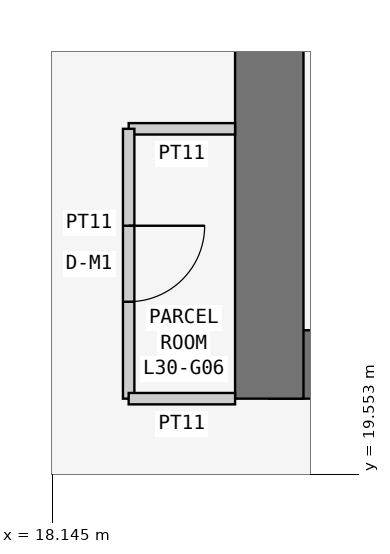
"""IFC4 building model, lengths in metres.
Left out: names, types, materials, properties, quantities, classifications, styles, units other than length and angle.
Written with IfcOpenShell. Run it as: python <this file> out.ifc"""

import sys

from ifc_helpers import new_model, si_unit, direction, frame, frame_2d, origin, place, context, subcontext, project, spatial, rectangle, extrude, element, fill, save


model = new_model("IFC4")
c1 = context("Model", 3, precision=1e-05, world=origin(), true_north=direction((0.0, 1.0)))
c2 = subcontext(c1, "Body", "Model", "MODEL_VIEW")
j1 = project(units=[si_unit("LENGTHUNIT", "METRE"), si_unit("PLANEANGLEUNIT", "RADIAN")], contexts=[c1])
p1 = place(None, origin())
s1 = spatial("IfcSite", under=j1, at=p1, CompositionType="ELEMENT")
p2 = place(p1, origin())
s2 = spatial("IfcBuilding", under=s1, at=p2, CompositionType="ELEMENT")
p3 = place(p2, frame((0.0, 0.0, 119.7)))
s3 = spatial("IfcBuildingStorey", under=s2, at=p3, CompositionType="ELEMENT", Elevation=119.7)
p4 = place(p3, frame((21.0, 21.0, 0.0), z_axis=(0.0, 0.0, 1.0), x_axis=(1.0, 0.0, 0.0)))
e1 = element("IfcWall", 1, at=p4, inside=s3, PredefinedType="SHEAR", context=c2, shape_type="SweptSolid", body=[
    extrude(rectangle(XDim=17.25, YDim=0.9, at=frame_2d((8.625, 0.0))), origin(), (0.0, 0.0, 1.0), 3.6),
])
p5 = place(p3, frame((21.0, 37.8, 0.0), z_axis=(0.0, 0.0, 1.0), x_axis=(0.0, -1.0, 0.0)))
e2 = element("IfcWall", 2, at=p5, inside=s3, PredefinedType="SHEAR", context=c2, shape_type="SweptSolid", body=[
    extrude(rectangle(XDim=17.25, YDim=0.9, at=frame_2d((8.625, 0.0))), origin(), (0.0, 0.0, 1.0), 3.6),
])
p6 = place(p5, frame((5.4, 0.0, 0.0)))
e3 = element("IfcOpeningElement", 3, at=p6, cuts=e2, PredefinedType="OPENING", context=c2, shape_type="SweptSolid", body=[
    extrude(rectangle(XDim=1.2, YDim=2.1, at=frame_2d((0.6, 1.05))), frame((0.0, 0.46, 0.0), z_axis=(0.0, -1.0, 0.0), x_axis=(1.0, 0.0, 0.0)), (0.0, 0.0, 1.0), 0.92),
])
p7 = place(p3, frame((20.55, 24.1, 0.0), z_axis=(0.0, 0.0, 1.0), x_axis=(-1.0, 0.0, 0.0)))
e4 = element("IfcWall", 4, at=p7, inside=s3, PredefinedType="PARTITIONING", context=c2, shape_type="SweptSolid", body=[
    extrude(rectangle(XDim=1.4, YDim=0.15, at=frame_2d((0.7, 0.0))), origin(), (0.0, 0.0, 1.0), 3.45),
])
p8 = place(p3, frame((19.15, 24.1, 0.0), z_axis=(0.0, 0.0, 1.0), x_axis=(0.0, -1.0, 0.0)))
e5 = element("IfcWall", 5, at=p8, inside=s3, PredefinedType="PARTITIONING", context=c2, shape_type="SweptSolid", body=[
    extrude(rectangle(XDim=3.55, YDim=0.15, at=frame_2d((1.775, 0.0))), origin(), (0.0, 0.0, 1.0), 3.45),
])
p9 = place(p8, frame((1.275, 0.0, 0.0)))
e6 = element("IfcOpeningElement", 6, at=p9, cuts=e5, PredefinedType="OPENING", context=c2, shape_type="SweptSolid", body=[
    extrude(rectangle(XDim=1.0, YDim=2.1, at=frame_2d((0.5, 1.05))), frame((0.0, 0.085, 0.0), z_axis=(0.0, -1.0, 0.0), x_axis=(1.0, 0.0, 0.0)), (0.0, 0.0, 1.0), 0.17),
])
p10 = place(p3, frame((19.15, 20.55, 0.0), z_axis=(0.0, 0.0, 1.0), x_axis=(1.0, 0.0, 0.0)))
e7 = element("IfcWall", 7, at=p10, inside=s3, PredefinedType="PARTITIONING", context=c2, shape_type="SweptSolid", body=[
    extrude(rectangle(XDim=1.4, YDim=0.15, at=frame_2d((0.7, 0.0))), origin(), (0.0, 0.0, 1.0), 3.45),
])
p11 = place(p9, origin())
e8 = element("IfcDoor", 8, at=p11, inside=s3, OperationType="SINGLE_SWING_LEFT", PredefinedType="DOOR", context=c2, shape_type="SweptSolid", body=[
    extrude(rectangle(XDim=1.0, YDim=2.1, at=frame_2d((0.5, 1.05))), frame((0.0, 0.025, 0.0), z_axis=(0.0, -1.0, 0.0), x_axis=(1.0, 0.0, 0.0)), (0.0, 0.0, 1.0), 0.05),
])
fill(e6, e8)
save(model, sys.argv[1])
